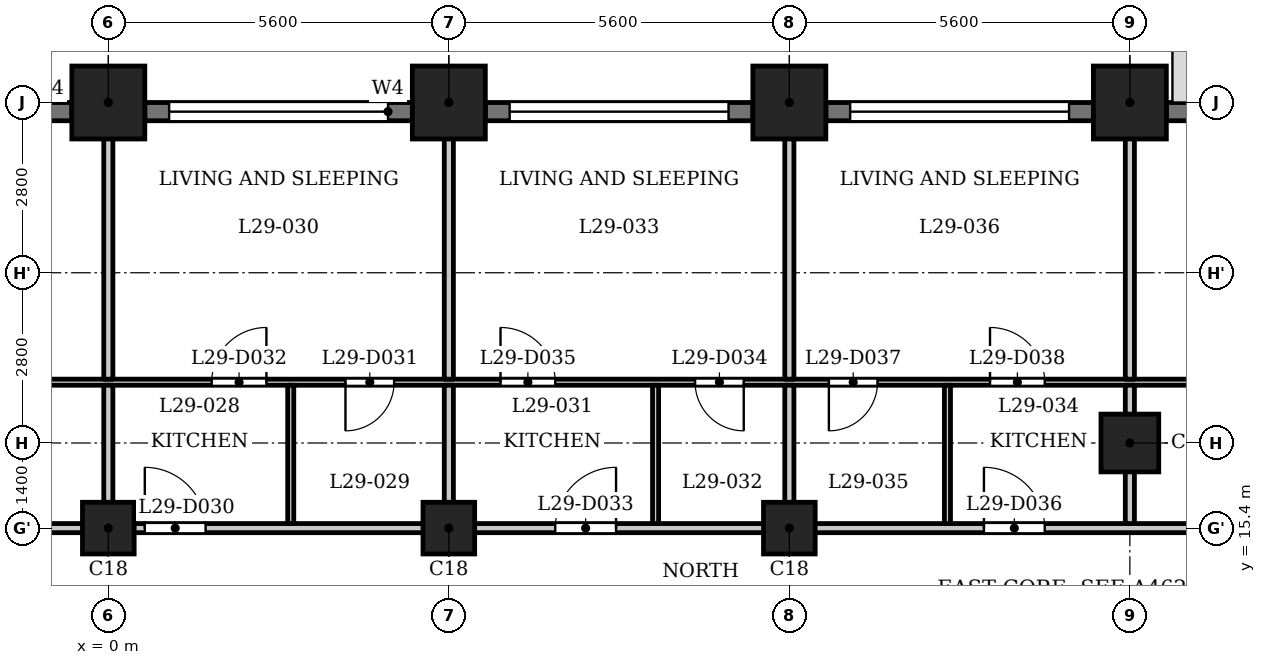
"""IFC4 building model, lengths in metres.
Left out: names, types, materials, properties, quantities, classifications, styles, units other than length and angle.
Written with IfcOpenShell. Run it as: python <this file> out.ifc"""

import sys

from ifc_helpers import new_model, si_unit, direction, frame, frame_2d, origin, origin_2d, place, context, subcontext, project, spatial, rectangle, extrude, element, fill, save


model = new_model("IFC4")
c1 = context("Model", 3, precision=1e-05, world=origin(), true_north=direction((0.0, 1.0)))
c2 = subcontext(c1, "Body", "Model", "MODEL_VIEW")
j1 = project(units=[si_unit("LENGTHUNIT", "METRE"), si_unit("PLANEANGLEUNIT", "RADIAN")], contexts=[c1])
p1 = place(None, origin())
s1 = spatial("IfcSite", under=j1, at=p1, CompositionType="ELEMENT")
p2 = place(p1, origin())
s2 = spatial("IfcBuilding", under=s1, at=p2, CompositionType="ELEMENT")
p3 = place(p2, frame((0.0, 0.0, 114.8)))
s3 = spatial("IfcBuildingStorey", under=s2, at=p3, CompositionType="ELEMENT", Elevation=114.8)
for number, where, z_axis, x_axis in (
    (1, (16.8, 22.4, 0.0), (0.0, 0.0, 1.0), (1.0, 0.0, 0.0)),
    (2, (11.2, 22.4, 0.0), (0.0, 0.0, 1.0), (1.0, 0.0, 0.0)),
    (3, (5.6, 22.4, 0.0), (0.0, 0.0, 1.0), (1.0, 0.0, 0.0)),
    (4, (0.0, 22.4, 0.0), (0.0, 0.0, 1.0), (1.0, 0.0, 0.0)),
):
    element("IfcColumn", number, at=place(p3, frame(where, z_axis=z_axis, x_axis=x_axis)), inside=s3, PredefinedType="COLUMN", context=c2, shape_type="SweptSolid", body=[
        extrude(rectangle(XDim=1.2, YDim=1.2, at=origin_2d()), origin(), (0.0, 0.0, 1.0), 3.5),
    ])
p4 = place(p3, frame((16.8, 16.8, 0.0), z_axis=(0.0, 0.0, 1.0), x_axis=(1.0, 0.0, 0.0)))
e5 = element("IfcColumn", 5, at=p4, inside=s3, PredefinedType="COLUMN", context=c2, shape_type="SweptSolid", body=[
    extrude(rectangle(XDim=0.95, YDim=0.95, at=origin_2d()), origin(), (0.0, 0.0, 1.0), 3.5),
])
for number, where, z_axis, x_axis in (
    (6, (0.0, 15.4, 0.0), (0.0, 0.0, 1.0), (1.0, 0.0, 0.0)),
    (7, (5.6, 15.4, 0.0), (0.0, 0.0, 1.0), (1.0, 0.0, 0.0)),
    (8, (11.2, 15.4, 0.0), (0.0, 0.0, 1.0), (1.0, 0.0, 0.0)),
):
    element("IfcColumn", number, at=place(p3, frame(where, z_axis=z_axis, x_axis=x_axis)), inside=s3, PredefinedType="COLUMN", context=c2, shape_type="SweptSolid", body=[
        extrude(rectangle(XDim=0.85, YDim=0.85, at=origin_2d()), origin(), (0.0, 0.0, 1.0), 3.5),
    ])
p5 = place(p3, frame((20.0, 22.25, 0.0), z_axis=(0.0, 0.0, 1.0), x_axis=(-1.0, 0.0, 0.0)))
e9 = element("IfcWall", 9, at=p5, inside=s3, PredefinedType="SOLIDWALL", context=c2, shape_type="SweptSolid", body=[
    extrude(rectangle(XDim=2.6, YDim=0.3, at=frame_2d((1.3, 0.0))), origin(), (0.0, 0.0, 1.0), 2.4),
])
p6 = place(p5, frame((0.4, 0.0, 0.9)))
e10 = element("IfcOpeningElement", 10, at=p6, cuts=e9, PredefinedType="OPENING", context=c2, shape_type="SweptSolid", body=[
    extrude(rectangle(XDim=1.8, YDim=1.25, at=frame_2d((0.9, 0.625))), frame((0.0, 0.16, 0.0), z_axis=(0.0, -1.0, 0.0), x_axis=(1.0, 0.0, 0.0)), (0.0, 0.0, 1.0), 0.32),
])
p7 = place(p3, frame((16.2, 22.25, 0.0), z_axis=(0.0, 0.0, 1.0), x_axis=(-1.0, 0.0, 0.0)))
e11 = element("IfcWall", 11, at=p7, inside=s3, PredefinedType="SOLIDWALL", context=c2, shape_type="SweptSolid", body=[
    extrude(rectangle(XDim=4.4, YDim=0.3, at=frame_2d((2.2, 0.0))), origin(), (0.0, 0.0, 1.0), 2.4),
])
p8 = place(p7, frame((0.4, 0.0, 1.2)))
e12 = element("IfcOpeningElement", 12, at=p8, cuts=e11, PredefinedType="OPENING", context=c2, shape_type="SweptSolid", body=[
    extrude(rectangle(XDim=3.6, YDim=0.95, at=frame_2d((1.8, 0.475))), frame((0.0, 0.16, 0.0), z_axis=(0.0, -1.0, 0.0), x_axis=(1.0, 0.0, 0.0)), (0.0, 0.0, 1.0), 0.32),
])
p9 = place(p3, frame((10.6, 22.25, 0.0), z_axis=(0.0, 0.0, 1.0), x_axis=(-1.0, 0.0, 0.0)))
e13 = element("IfcWall", 13, at=p9, inside=s3, PredefinedType="SOLIDWALL", context=c2, shape_type="SweptSolid", body=[
    extrude(rectangle(XDim=4.4, YDim=0.3, at=frame_2d((2.2, 0.0))), origin(), (0.0, 0.0, 1.0), 2.4),
])
p10 = place(p9, frame((0.4, 0.0, 1.2)))
e14 = element("IfcOpeningElement", 14, at=p10, cuts=e13, PredefinedType="OPENING", context=c2, shape_type="SweptSolid", body=[
    extrude(rectangle(XDim=3.6, YDim=0.95, at=frame_2d((1.8, 0.475))), frame((0.0, 0.16, 0.0), z_axis=(0.0, -1.0, 0.0), x_axis=(1.0, 0.0, 0.0)), (0.0, 0.0, 1.0), 0.32),
])
p11 = place(p3, frame((5.0, 22.25, 0.0), z_axis=(0.0, 0.0, 1.0), x_axis=(-1.0, 0.0, 0.0)))
e15 = element("IfcWall", 15, at=p11, inside=s3, PredefinedType="SOLIDWALL", context=c2, shape_type="SweptSolid", body=[
    extrude(rectangle(XDim=4.4, YDim=0.3, at=frame_2d((2.2, 0.0))), origin(), (0.0, 0.0, 1.0), 2.4),
])
p12 = place(p11, frame((0.4, 0.0, 1.2)))
e16 = element("IfcOpeningElement", 16, at=p12, cuts=e15, PredefinedType="OPENING", context=c2, shape_type="SweptSolid", body=[
    extrude(rectangle(XDim=3.6, YDim=0.95, at=frame_2d((1.8, 0.475))), frame((0.0, 0.16, 0.0), z_axis=(0.0, -1.0, 0.0), x_axis=(1.0, 0.0, 0.0)), (0.0, 0.0, 1.0), 0.32),
])
p13 = place(p3, frame((-0.6, 22.25, 0.0), z_axis=(0.0, 0.0, 1.0), x_axis=(-1.0, 0.0, 0.0)))
e17 = element("IfcWall", 17, at=p13, inside=s3, PredefinedType="SOLIDWALL", context=c2, shape_type="SweptSolid", body=[
    extrude(rectangle(XDim=4.4, YDim=0.3, at=frame_2d((2.2, 0.0))), origin(), (0.0, 0.0, 1.0), 2.4),
])
p14 = place(p13, frame((0.4, 0.0, 1.2)))
e18 = element("IfcOpeningElement", 18, at=p14, cuts=e17, PredefinedType="OPENING", context=c2, shape_type="SweptSolid", body=[
    extrude(rectangle(XDim=3.6, YDim=0.95, at=frame_2d((1.8, 0.475))), frame((0.0, 0.16, 0.0), z_axis=(0.0, -1.0, 0.0), x_axis=(1.0, 0.0, 0.0)), (0.0, 0.0, 1.0), 0.32),
])
p15 = place(p3, frame((-27.484, 15.4, 0.0), z_axis=(0.0, 0.0, 1.0), x_axis=(1.0, 0.0, 0.0)))
e19 = element("IfcWall", 19, at=p15, inside=s3, PredefinedType="PARTITIONING", context=c2, shape_type="SweptSolid", body=[
    extrude(rectangle(XDim=54.968, YDim=0.15, at=frame_2d((27.484, 0.0))), origin(), (0.0, 0.0, 1.0), 3.2),
])
p16 = place(p15, frame((9.034, 0.0, 0.0)))
e20 = element("IfcOpeningElement", 20, at=p16, cuts=e19, PredefinedType="OPENING", context=c2, shape_type="SweptSolid", body=[
    extrude(rectangle(XDim=1.0, YDim=2.1, at=frame_2d((0.5, 1.05))), frame((0.0, 0.085, 0.0), z_axis=(0.0, -1.0, 0.0), x_axis=(1.0, 0.0, 0.0)), (0.0, 0.0, 1.0), 0.17),
])
p17 = place(p15, frame((14.634, 0.0, 0.0)))
e21 = element("IfcOpeningElement", 21, at=p17, cuts=e19, PredefinedType="OPENING", context=c2, shape_type="SweptSolid", body=[
    extrude(rectangle(XDim=1.0, YDim=2.1, at=frame_2d((0.5, 1.05))), frame((0.0, 0.085, 0.0), z_axis=(0.0, -1.0, 0.0), x_axis=(1.0, 0.0, 0.0)), (0.0, 0.0, 1.0), 0.17),
])
p18 = place(p15, frame((16.984, 0.0, 0.0)))
e22 = element("IfcOpeningElement", 22, at=p18, cuts=e19, PredefinedType="OPENING", context=c2, shape_type="SweptSolid", body=[
    extrude(rectangle(XDim=1.0, YDim=2.1, at=frame_2d((0.5, 1.05))), frame((0.0, 0.085, 0.0), z_axis=(0.0, -1.0, 0.0), x_axis=(1.0, 0.0, 0.0)), (0.0, 0.0, 1.0), 0.17),
])
p19 = place(p15, frame((28.084, 0.0, 0.0)))
e23 = element("IfcOpeningElement", 23, at=p19, cuts=e19, PredefinedType="OPENING", context=c2, shape_type="SweptSolid", body=[
    extrude(rectangle(XDim=1.0, YDim=2.1, at=frame_2d((0.5, 1.05))), frame((0.0, 0.085, 0.0), z_axis=(0.0, -1.0, 0.0), x_axis=(1.0, 0.0, 0.0)), (0.0, 0.0, 1.0), 0.17),
])
p20 = place(p15, frame((34.834, 0.0, 0.0)))
e24 = element("IfcOpeningElement", 24, at=p20, cuts=e19, PredefinedType="OPENING", context=c2, shape_type="SweptSolid", body=[
    extrude(rectangle(XDim=1.0, YDim=2.1, at=frame_2d((0.5, 1.05))), frame((0.0, 0.085, 0.0), z_axis=(0.0, -1.0, 0.0), x_axis=(1.0, 0.0, 0.0)), (0.0, 0.0, 1.0), 0.17),
])
p21 = place(p15, frame((41.884, 0.0, 0.0)))
e25 = element("IfcOpeningElement", 25, at=p21, cuts=e19, PredefinedType="OPENING", context=c2, shape_type="SweptSolid", body=[
    extrude(rectangle(XDim=1.0, YDim=2.1, at=frame_2d((0.5, 1.05))), frame((0.0, 0.085, 0.0), z_axis=(0.0, -1.0, 0.0), x_axis=(1.0, 0.0, 0.0)), (0.0, 0.0, 1.0), 0.17),
])
p22 = place(p15, frame((48.234, 0.0, 0.0)))
e26 = element("IfcOpeningElement", 26, at=p22, cuts=e19, PredefinedType="OPENING", context=c2, shape_type="SweptSolid", body=[
    extrude(rectangle(XDim=1.0, YDim=2.1, at=frame_2d((0.5, 1.05))), frame((0.0, 0.085, 0.0), z_axis=(0.0, -1.0, 0.0), x_axis=(1.0, 0.0, 0.0)), (0.0, 0.0, 1.0), 0.17),
])
p23 = place(p3, frame((-26.465, 17.8, 0.0), z_axis=(0.0, 0.0, 1.0), x_axis=(1.0, 0.0, 0.0)))
e27 = element("IfcWall", 27, at=p23, inside=s3, PredefinedType="PARTITIONING", context=c2, shape_type="SweptSolid", body=[
    extrude(rectangle(XDim=52.859, YDim=0.1, at=frame_2d((26.43, 0.0))), origin(), (0.0, 0.0, 1.0), 3.2),
])
p24 = place(p23, frame((2.697, 0.0, 0.0)))
e28 = element("IfcOpeningElement", 28, at=p24, cuts=e27, PredefinedType="OPENING", context=c2, shape_type="SweptSolid", body=[
    extrude(rectangle(XDim=0.8, YDim=2.1, at=frame_2d((0.4, 1.05))), frame((0.0, 0.06, 0.0), z_axis=(0.0, -1.0, 0.0), x_axis=(1.0, 0.0, 0.0)), (0.0, 0.0, 1.0), 0.12),
])
p25 = place(p23, frame((7.115, 0.0, 0.0)))
e29 = element("IfcOpeningElement", 29, at=p25, cuts=e27, PredefinedType="OPENING", context=c2, shape_type="SweptSolid", body=[
    extrude(rectangle(XDim=0.9, YDim=2.1, at=frame_2d((0.45, 1.05))), frame((0.0, 0.06, 0.0), z_axis=(0.0, -1.0, 0.0), x_axis=(1.0, 0.0, 0.0)), (0.0, 0.0, 1.0), 0.12),
])
p26 = place(p23, frame((10.315, 0.0, 0.0)))
e30 = element("IfcOpeningElement", 30, at=p26, cuts=e27, PredefinedType="OPENING", context=c2, shape_type="SweptSolid", body=[
    extrude(rectangle(XDim=0.8, YDim=2.1, at=frame_2d((0.4, 1.05))), frame((0.0, 0.06, 0.0), z_axis=(0.0, -1.0, 0.0), x_axis=(1.0, 0.0, 0.0)), (0.0, 0.0, 1.0), 0.12),
])
p27 = place(p23, frame((12.715, 0.0, 0.0)))
e31 = element("IfcOpeningElement", 31, at=p27, cuts=e27, PredefinedType="OPENING", context=c2, shape_type="SweptSolid", body=[
    extrude(rectangle(XDim=0.9, YDim=2.1, at=frame_2d((0.45, 1.05))), frame((0.0, 0.06, 0.0), z_axis=(0.0, -1.0, 0.0), x_axis=(1.0, 0.0, 0.0)), (0.0, 0.0, 1.0), 0.12),
])
p28 = place(p23, frame((21.515, 0.0, 0.0)))
e32 = element("IfcOpeningElement", 32, at=p28, cuts=e27, PredefinedType="OPENING", context=c2, shape_type="SweptSolid", body=[
    extrude(rectangle(XDim=0.8, YDim=2.1, at=frame_2d((0.4, 1.05))), frame((0.0, 0.06, 0.0), z_axis=(0.0, -1.0, 0.0), x_axis=(1.0, 0.0, 0.0)), (0.0, 0.0, 1.0), 0.12),
])
p29 = place(p23, frame((17.065, 0.0, 0.0)))
e33 = element("IfcOpeningElement", 33, at=p29, cuts=e27, PredefinedType="OPENING", context=c2, shape_type="SweptSolid", body=[
    extrude(rectangle(XDim=0.9, YDim=2.1, at=frame_2d((0.45, 1.05))), frame((0.0, 0.06, 0.0), z_axis=(0.0, -1.0, 0.0), x_axis=(1.0, 0.0, 0.0)), (0.0, 0.0, 1.0), 0.12),
])
p30 = place(p23, frame((30.365, 0.0, 0.0)))
e34 = element("IfcOpeningElement", 34, at=p30, cuts=e27, PredefinedType="OPENING", context=c2, shape_type="SweptSolid", body=[
    extrude(rectangle(XDim=0.8, YDim=2.1, at=frame_2d((0.4, 1.05))), frame((0.0, 0.06, 0.0), z_axis=(0.0, -1.0, 0.0), x_axis=(1.0, 0.0, 0.0)), (0.0, 0.0, 1.0), 0.12),
])
p31 = place(p23, frame((28.165, 0.0, 0.0)))
e35 = element("IfcOpeningElement", 35, at=p31, cuts=e27, PredefinedType="OPENING", context=c2, shape_type="SweptSolid", body=[
    extrude(rectangle(XDim=0.9, YDim=2.1, at=frame_2d((0.45, 1.05))), frame((0.0, 0.06, 0.0), z_axis=(0.0, -1.0, 0.0), x_axis=(1.0, 0.0, 0.0)), (0.0, 0.0, 1.0), 0.12),
])
p32 = place(p23, frame((36.115, 0.0, 0.0)))
e36 = element("IfcOpeningElement", 36, at=p32, cuts=e27, PredefinedType="OPENING", context=c2, shape_type="SweptSolid", body=[
    extrude(rectangle(XDim=0.8, YDim=2.1, at=frame_2d((0.4, 1.05))), frame((0.0, 0.06, 0.0), z_axis=(0.0, -1.0, 0.0), x_axis=(1.0, 0.0, 0.0)), (0.0, 0.0, 1.0), 0.12),
])
p33 = place(p23, frame((32.915, 0.0, 0.0)))
e37 = element("IfcOpeningElement", 37, at=p33, cuts=e27, PredefinedType="OPENING", context=c2, shape_type="SweptSolid", body=[
    extrude(rectangle(XDim=0.9, YDim=2.1, at=frame_2d((0.45, 1.05))), frame((0.0, 0.06, 0.0), z_axis=(0.0, -1.0, 0.0), x_axis=(1.0, 0.0, 0.0)), (0.0, 0.0, 1.0), 0.12),
])
p34 = place(p23, frame((38.315, 0.0, 0.0)))
e38 = element("IfcOpeningElement", 38, at=p34, cuts=e27, PredefinedType="OPENING", context=c2, shape_type="SweptSolid", body=[
    extrude(rectangle(XDim=0.8, YDim=2.1, at=frame_2d((0.4, 1.05))), frame((0.0, 0.06, 0.0), z_axis=(0.0, -1.0, 0.0), x_axis=(1.0, 0.0, 0.0)), (0.0, 0.0, 1.0), 0.12),
])
p35 = place(p23, frame((40.965, 0.0, 0.0)))
e39 = element("IfcOpeningElement", 39, at=p35, cuts=e27, PredefinedType="OPENING", context=c2, shape_type="SweptSolid", body=[
    extrude(rectangle(XDim=0.9, YDim=2.1, at=frame_2d((0.45, 1.05))), frame((0.0, 0.06, 0.0), z_axis=(0.0, -1.0, 0.0), x_axis=(1.0, 0.0, 0.0)), (0.0, 0.0, 1.0), 0.12),
])
p36 = place(p23, frame((51.265, 0.0, 0.0)))
e40 = element("IfcOpeningElement", 40, at=p36, cuts=e27, PredefinedType="OPENING", context=c2, shape_type="SweptSolid", body=[
    extrude(rectangle(XDim=0.8, YDim=2.1, at=frame_2d((0.4, 1.05))), frame((0.0, 0.06, 0.0), z_axis=(0.0, -1.0, 0.0), x_axis=(1.0, 0.0, 0.0)), (0.0, 0.0, 1.0), 0.12),
])
p37 = place(p23, frame((46.315, 0.0, 0.0)))
e41 = element("IfcOpeningElement", 41, at=p37, cuts=e27, PredefinedType="OPENING", context=c2, shape_type="SweptSolid", body=[
    extrude(rectangle(XDim=0.9, YDim=2.1, at=frame_2d((0.45, 1.05))), frame((0.0, 0.06, 0.0), z_axis=(0.0, -1.0, 0.0), x_axis=(1.0, 0.0, 0.0)), (0.0, 0.0, 1.0), 0.12),
])
p38 = place(p3, frame((0.0, 15.475, 0.0), z_axis=(0.0, 0.0, 1.0), x_axis=(0.0, 1.0, 0.0)))
e42 = element("IfcWall", 42, at=p38, inside=s3, PredefinedType="PARTITIONING", context=c2, shape_type="SweptSolid", body=[
    extrude(rectangle(XDim=2.275, YDim=0.15, at=frame_2d((1.137, 0.0))), origin(), (0.0, 0.0, 1.0), 3.2),
])
p39 = place(p3, frame((0.0, 17.85, 0.0), z_axis=(0.0, 0.0, 1.0), x_axis=(0.0, 1.0, 0.0)))
e43 = element("IfcWall", 43, at=p39, inside=s3, PredefinedType="PARTITIONING", context=c2, shape_type="SweptSolid", body=[
    extrude(rectangle(XDim=5.13, YDim=0.15, at=frame_2d((2.565, 0.0))), origin(), (0.0, 0.0, 1.0), 3.2),
])
p40 = place(p3, frame((3.0, 15.475, 0.0), z_axis=(0.0, 0.0, 1.0), x_axis=(0.0, 1.0, 0.0)))
e44 = element("IfcWall", 44, at=p40, inside=s3, PredefinedType="PARTITIONING", context=c2, shape_type="SweptSolid", body=[
    extrude(rectangle(XDim=2.275, YDim=0.1, at=frame_2d((1.137, 0.0))), origin(), (0.0, 0.0, 1.0), 3.2),
])
p41 = place(p3, frame((5.6, 15.475, 0.0), z_axis=(0.0, 0.0, 1.0), x_axis=(0.0, 1.0, 0.0)))
e45 = element("IfcWall", 45, at=p41, inside=s3, PredefinedType="PARTITIONING", context=c2, shape_type="SweptSolid", body=[
    extrude(rectangle(XDim=2.275, YDim=0.15, at=frame_2d((1.137, 0.0))), origin(), (0.0, 0.0, 1.0), 3.2),
])
p42 = place(p3, frame((5.6, 17.85, 0.0), z_axis=(0.0, 0.0, 1.0), x_axis=(0.0, 1.0, 0.0)))
e46 = element("IfcWall", 46, at=p42, inside=s3, PredefinedType="PARTITIONING", context=c2, shape_type="SweptSolid", body=[
    extrude(rectangle(XDim=5.13, YDim=0.15, at=frame_2d((2.565, 0.0))), origin(), (0.0, 0.0, 1.0), 3.2),
])
p43 = place(p3, frame((9.0, 15.475, 0.0), z_axis=(0.0, 0.0, 1.0), x_axis=(0.0, 1.0, 0.0)))
e47 = element("IfcWall", 47, at=p43, inside=s3, PredefinedType="PARTITIONING", context=c2, shape_type="SweptSolid", body=[
    extrude(rectangle(XDim=2.275, YDim=0.1, at=frame_2d((1.137, 0.0))), origin(), (0.0, 0.0, 1.0), 3.2),
])
p44 = place(p3, frame((11.2, 15.475, 0.0), z_axis=(0.0, 0.0, 1.0), x_axis=(0.0, 1.0, 0.0)))
e48 = element("IfcWall", 48, at=p44, inside=s3, PredefinedType="PARTITIONING", context=c2, shape_type="SweptSolid", body=[
    extrude(rectangle(XDim=2.275, YDim=0.15, at=frame_2d((1.137, 0.0))), origin(), (0.0, 0.0, 1.0), 3.2),
])
p45 = place(p3, frame((11.2, 17.85, 0.0), z_axis=(0.0, 0.0, 1.0), x_axis=(0.0, 1.0, 0.0)))
e49 = element("IfcWall", 49, at=p45, inside=s3, PredefinedType="PARTITIONING", context=c2, shape_type="SweptSolid", body=[
    extrude(rectangle(XDim=5.13, YDim=0.15, at=frame_2d((2.565, 0.0))), origin(), (0.0, 0.0, 1.0), 3.2),
])
p46 = place(p3, frame((13.8, 15.475, 0.0), z_axis=(0.0, 0.0, 1.0), x_axis=(0.0, 1.0, 0.0)))
e50 = element("IfcWall", 50, at=p46, inside=s3, PredefinedType="PARTITIONING", context=c2, shape_type="SweptSolid", body=[
    extrude(rectangle(XDim=2.275, YDim=0.1, at=frame_2d((1.137, 0.0))), origin(), (0.0, 0.0, 1.0), 3.2),
])
p47 = place(p3, frame((16.8, 15.475, 0.0), z_axis=(0.0, 0.0, 1.0), x_axis=(0.0, 1.0, 0.0)))
e51 = element("IfcWall", 51, at=p47, inside=s3, PredefinedType="PARTITIONING", context=c2, shape_type="SweptSolid", body=[
    extrude(rectangle(XDim=2.275, YDim=0.15, at=frame_2d((1.137, 0.0))), origin(), (0.0, 0.0, 1.0), 3.2),
])
p48 = place(p3, frame((16.8, 17.85, 0.0), z_axis=(0.0, 0.0, 1.0), x_axis=(0.0, 1.0, 0.0)))
e52 = element("IfcWall", 52, at=p48, inside=s3, PredefinedType="PARTITIONING", context=c2, shape_type="SweptSolid", body=[
    extrude(rectangle(XDim=5.13, YDim=0.15, at=frame_2d((2.565, 0.0))), origin(), (0.0, 0.0, 1.0), 3.2),
])
p49 = place(p19, origin())
e53 = element("IfcDoor", 53, at=p49, inside=s3, OperationType="SINGLE_SWING_RIGHT", PredefinedType="DOOR", context=c2, shape_type="SweptSolid", body=[
    extrude(rectangle(XDim=1.0, YDim=2.1, at=frame_2d((0.5, 1.05))), frame((0.0, 0.025, 0.0), z_axis=(0.0, -1.0, 0.0), x_axis=(1.0, 0.0, 0.0)), (0.0, 0.0, 1.0), 0.05),
])
fill(e23, e53)
p50 = place(p30, origin())
e54 = element("IfcDoor", 54, at=p50, inside=s3, OperationType="SINGLE_SWING_LEFT", PredefinedType="DOOR", context=c2, shape_type="SweptSolid", body=[
    extrude(rectangle(XDim=0.8, YDim=2.1, at=frame_2d((0.4, 1.05))), frame((0.0, 0.025, 0.0), z_axis=(0.0, -1.0, 0.0), x_axis=(1.0, 0.0, 0.0)), (0.0, 0.0, 1.0), 0.05),
])
fill(e34, e54)
p51 = place(p31, origin())
e55 = element("IfcDoor", 55, at=p51, inside=s3, OperationType="SINGLE_SWING_LEFT", PredefinedType="DOOR", context=c2, shape_type="SweptSolid", body=[
    extrude(rectangle(XDim=0.9, YDim=2.1, at=frame_2d((0.45, 1.05))), frame((0.0, 0.025, 0.0), z_axis=(0.0, -1.0, 0.0), x_axis=(1.0, 0.0, 0.0)), (0.0, 0.0, 1.0), 0.05),
])
fill(e35, e55)
p52 = place(p20, origin())
e56 = element("IfcDoor", 56, at=p52, inside=s3, OperationType="SINGLE_SWING_LEFT", PredefinedType="DOOR", context=c2, shape_type="SweptSolid", body=[
    extrude(rectangle(XDim=1.0, YDim=2.1, at=frame_2d((0.5, 1.05))), frame((0.0, 0.025, 0.0), z_axis=(0.0, -1.0, 0.0), x_axis=(1.0, 0.0, 0.0)), (0.0, 0.0, 1.0), 0.05),
])
fill(e24, e56)
p53 = place(p32, origin())
e57 = element("IfcDoor", 57, at=p53, inside=s3, OperationType="SINGLE_SWING_RIGHT", PredefinedType="DOOR", context=c2, shape_type="SweptSolid", body=[
    extrude(rectangle(XDim=0.8, YDim=2.1, at=frame_2d((0.4, 1.05))), frame((0.0, 0.025, 0.0), z_axis=(0.0, -1.0, 0.0), x_axis=(1.0, 0.0, 0.0)), (0.0, 0.0, 1.0), 0.05),
])
fill(e36, e57)
p54 = place(p33, origin())
e58 = element("IfcDoor", 58, at=p54, inside=s3, OperationType="SINGLE_SWING_RIGHT", PredefinedType="DOOR", context=c2, shape_type="SweptSolid", body=[
    extrude(rectangle(XDim=0.9, YDim=2.1, at=frame_2d((0.45, 1.05))), frame((0.0, 0.025, 0.0), z_axis=(0.0, -1.0, 0.0), x_axis=(1.0, 0.0, 0.0)), (0.0, 0.0, 1.0), 0.05),
])
fill(e37, e58)
p55 = place(p21, origin())
e59 = element("IfcDoor", 59, at=p55, inside=s3, OperationType="SINGLE_SWING_RIGHT", PredefinedType="DOOR", context=c2, shape_type="SweptSolid", body=[
    extrude(rectangle(XDim=1.0, YDim=2.1, at=frame_2d((0.5, 1.05))), frame((0.0, 0.025, 0.0), z_axis=(0.0, -1.0, 0.0), x_axis=(1.0, 0.0, 0.0)), (0.0, 0.0, 1.0), 0.05),
])
fill(e25, e59)
p56 = place(p34, origin())
e60 = element("IfcDoor", 60, at=p56, inside=s3, OperationType="SINGLE_SWING_LEFT", PredefinedType="DOOR", context=c2, shape_type="SweptSolid", body=[
    extrude(rectangle(XDim=0.8, YDim=2.1, at=frame_2d((0.4, 1.05))), frame((0.0, 0.025, 0.0), z_axis=(0.0, -1.0, 0.0), x_axis=(1.0, 0.0, 0.0)), (0.0, 0.0, 1.0), 0.05),
])
fill(e38, e60)
p57 = place(p35, origin())
e61 = element("IfcDoor", 61, at=p57, inside=s3, OperationType="SINGLE_SWING_RIGHT", PredefinedType="DOOR", context=c2, shape_type="SweptSolid", body=[
    extrude(rectangle(XDim=0.9, YDim=2.1, at=frame_2d((0.45, 1.05))), frame((0.0, 0.025, 0.0), z_axis=(0.0, -1.0, 0.0), x_axis=(1.0, 0.0, 0.0)), (0.0, 0.0, 1.0), 0.05),
])
fill(e39, e61)
p58 = place(p8, origin())
e62 = element("IfcWindow", 62, at=p58, inside=s3, PartitioningType="SINGLE_PANEL", PredefinedType="WINDOW", context=c2, shape_type="SweptSolid", body=[
    extrude(rectangle(XDim=3.6, YDim=0.95, at=frame_2d((1.8, 0.475))), frame((0.0, 0.03, 0.0), z_axis=(0.0, -1.0, 0.0), x_axis=(1.0, 0.0, 0.0)), (0.0, 0.0, 1.0), 0.06),
])
fill(e12, e62)
p59 = place(p10, origin())
e63 = element("IfcWindow", 63, at=p59, inside=s3, PartitioningType="SINGLE_PANEL", PredefinedType="WINDOW", context=c2, shape_type="SweptSolid", body=[
    extrude(rectangle(XDim=3.6, YDim=0.95, at=frame_2d((1.8, 0.475))), frame((0.0, 0.03, 0.0), z_axis=(0.0, -1.0, 0.0), x_axis=(1.0, 0.0, 0.0)), (0.0, 0.0, 1.0), 0.06),
])
fill(e14, e63)
p60 = place(p12, origin())
e64 = element("IfcWindow", 64, at=p60, inside=s3, PartitioningType="SINGLE_PANEL", PredefinedType="WINDOW", context=c2, shape_type="SweptSolid", body=[
    extrude(rectangle(XDim=3.6, YDim=0.95, at=frame_2d((1.8, 0.475))), frame((0.0, 0.03, 0.0), z_axis=(0.0, -1.0, 0.0), x_axis=(1.0, 0.0, 0.0)), (0.0, 0.0, 1.0), 0.06),
])
fill(e16, e64)
save(model, sys.argv[1])
